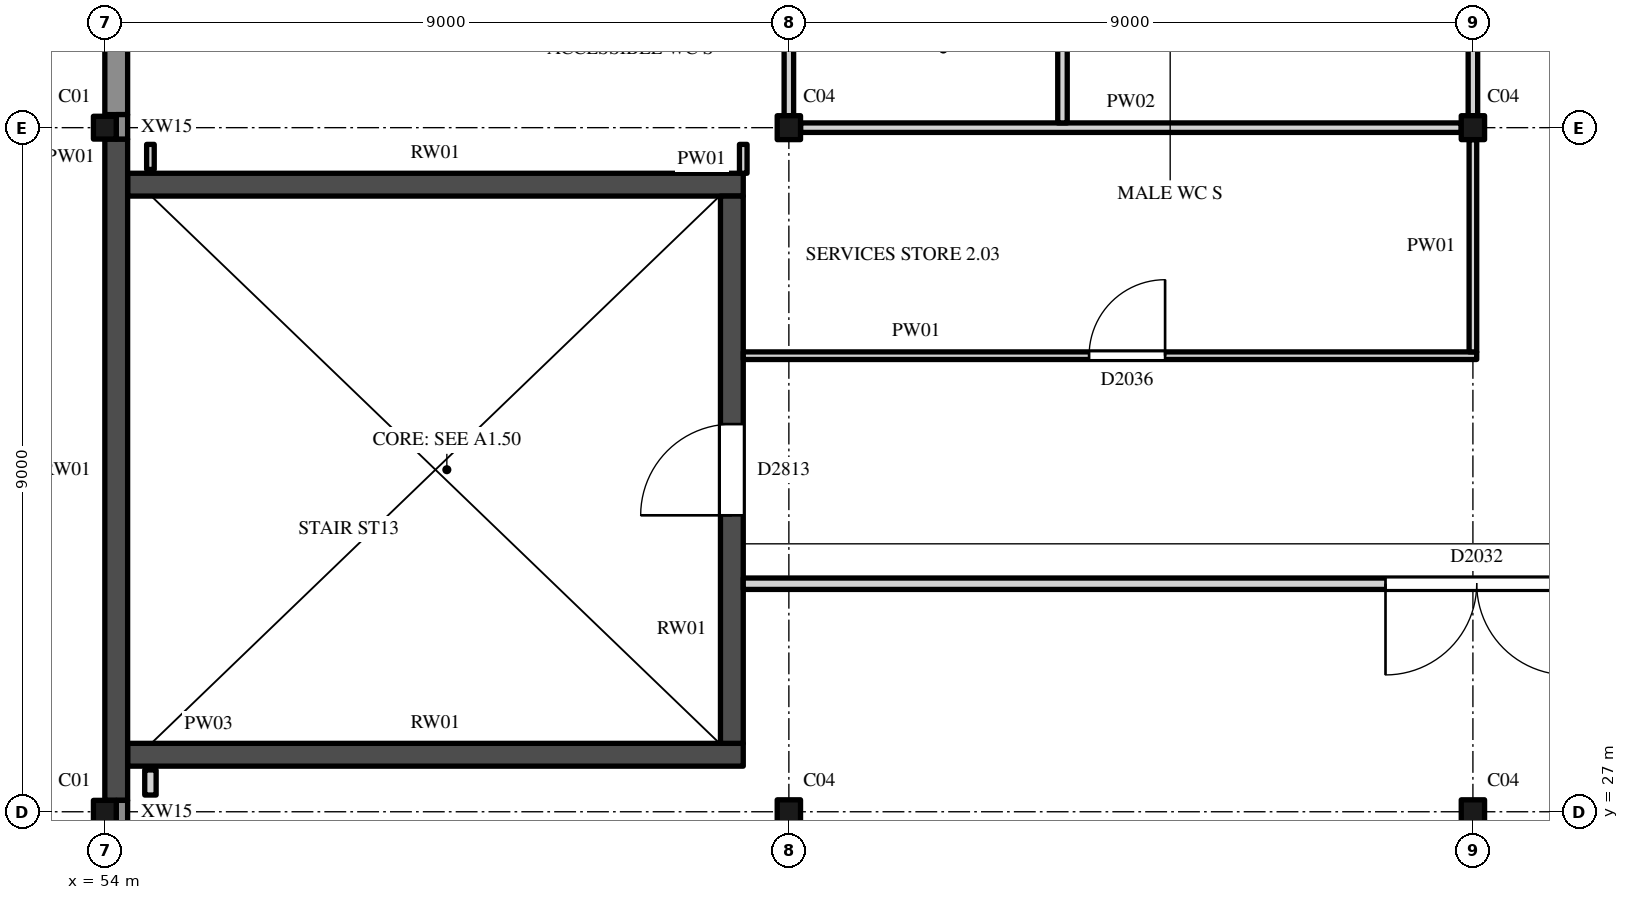
"""IFC4 building model, lengths in metres.
Left out: names, types, materials, properties, quantities, classifications, styles, units other than length and angle.
Written with IfcOpenShell. Run it as: python <this file> out.ifc"""

import sys

from ifc_helpers import new_model, si_unit, direction, frame, frame_2d, origin, origin_2d, place, context, subcontext, project, spatial, rectangle, hollow_rectangle, i_section, extrude, element, fill, save


model = new_model("IFC4")
c1 = context("Model", 3, precision=1e-05, world=origin(), true_north=direction((0.0, 1.0)))
c2 = subcontext(c1, "Body", "Model", "MODEL_VIEW")
j1 = project(units=[si_unit("LENGTHUNIT", "METRE"), si_unit("PLANEANGLEUNIT", "RADIAN")], contexts=[c1])
p1 = place(None, origin())
s1 = spatial("IfcSite", under=j1, at=p1, CompositionType="ELEMENT")
p2 = place(p1, origin())
s2 = spatial("IfcBuilding", under=s1, at=p2, CompositionType="ELEMENT")
p3 = place(p2, frame((0.0, 0.0, 11.0)))
s3 = spatial("IfcBuildingStorey", under=s2, at=p3, CompositionType="ELEMENT", Elevation=11.0)
p4 = place(p3, frame((54.0, 27.0, 0.0), z_axis=(0.0, 0.0, 1.0), x_axis=(1.0, 0.0, 0.0)))
e1 = element("IfcColumn", 1, at=p4, inside=s3, PredefinedType="COLUMN", context=c2, shape_type="SweptSolid", body=[
    extrude(hollow_rectangle(XDim=0.3, YDim=0.3, WallThickness=0.012, InnerFilletRadius=0.019, OuterFilletRadius=0.031, at=origin_2d()), origin(), (0.0, 0.0, 1.0), 5.0),
])
for number, where, z_axis, x_axis in (
    (2, (63.0, 27.0, 0.0), (0.0, 0.0, 1.0), (1.0, 0.0, 0.0)),
    (3, (72.0, 27.0, 0.0), (0.0, 0.0, 1.0), (1.0, 0.0, 0.0)),
):
    element("IfcColumn", number, at=place(p3, frame(where, z_axis=z_axis, x_axis=x_axis)), inside=s3, PredefinedType="COLUMN", context=c2, shape_type="SweptSolid", body=[
        extrude(i_section(OverallWidth=0.307, OverallDepth=0.315, WebThickness=0.012, FlangeThickness=0.019, FilletRadius=0.017, at=origin_2d()), origin(), (0.0, 0.0, 1.0), 5.0),
    ])
p5 = place(p3, frame((54.0, 36.0, 0.0), z_axis=(0.0, 0.0, 1.0), x_axis=(1.0, 0.0, 0.0)))
e4 = element("IfcColumn", 4, at=p5, inside=s3, PredefinedType="COLUMN", context=c2, shape_type="SweptSolid", body=[
    extrude(hollow_rectangle(XDim=0.3, YDim=0.3, WallThickness=0.012, InnerFilletRadius=0.019, OuterFilletRadius=0.031, at=origin_2d()), origin(), (0.0, 0.0, 1.0), 5.0),
])
for number, where, z_axis, x_axis in (
    (5, (63.0, 36.0, 0.0), (0.0, 0.0, 1.0), (1.0, 0.0, 0.0)),
    (6, (72.0, 36.0, 0.0), (0.0, 0.0, 1.0), (1.0, 0.0, 0.0)),
):
    element("IfcColumn", number, at=place(p3, frame(where, z_axis=z_axis, x_axis=x_axis)), inside=s3, PredefinedType="COLUMN", context=c2, shape_type="SweptSolid", body=[
        extrude(i_section(OverallWidth=0.307, OverallDepth=0.315, WebThickness=0.012, FlangeThickness=0.019, FilletRadius=0.017, at=origin_2d()), origin(), (0.0, 0.0, 1.0), 5.0),
    ])
for number, where, z_axis, x_axis in (
    (7, (54.3, 27.75, 0.0), (0.0, 0.0, 1.0), (1.0, 0.0, 0.0)),
    (8, (54.3, 35.25, 0.0), (0.0, 0.0, 1.0), (1.0, 0.0, 0.0)),
):
    element("IfcWall", number, at=place(p3, frame(where, z_axis=z_axis, x_axis=x_axis)), inside=s3, PredefinedType="SHEAR", context=c2, shape_type="SweptSolid", body=[
        extrude(rectangle(XDim=8.1, YDim=0.3, at=frame_2d((4.05, 0.0))), origin(), (0.0, 0.0, 1.0), 4.825),
    ])
p6 = place(p3, frame((54.15, 27.15, 0.0), z_axis=(0.0, 0.0, 1.0), x_axis=(0.0, 1.0, 0.0)))
e9 = element("IfcWall", 9, at=p6, inside=s3, PredefinedType="SHEAR", context=c2, shape_type="SweptSolid", body=[
    extrude(rectangle(XDim=8.7, YDim=0.3, at=frame_2d((4.35, 0.0))), origin(), (0.0, 0.0, 1.0), 4.825),
])
p7 = place(p3, frame((62.25, 27.9, 0.0), z_axis=(0.0, 0.0, 1.0), x_axis=(0.0, 1.0, 0.0)))
e10 = element("IfcWall", 10, at=p7, inside=s3, PredefinedType="SHEAR", context=c2, shape_type="SweptSolid", body=[
    extrude(rectangle(XDim=7.2, YDim=0.3, at=frame_2d((3.6, 0.0))), origin(), (0.0, 0.0, 1.0), 4.825),
])
p8 = place(p7, frame((3.0, 0.0, 0.0)))
e11 = element("IfcOpeningElement", 11, at=p8, cuts=e10, PredefinedType="OPENING", context=c2, shape_type="SweptSolid", body=[
    extrude(rectangle(XDim=1.2, YDim=2.1, at=frame_2d((0.6, 1.05))), frame((0.0, 0.16, 0.0), z_axis=(0.0, -1.0, 0.0), x_axis=(1.0, 0.0, 0.0)), (0.0, 0.0, 1.0), 0.32),
])
p9 = place(p3, frame((54.15, 36.172, 0.0), z_axis=(0.0, 0.0, 1.0), x_axis=(0.0, 1.0, 0.0)))
e12 = element("IfcWall", 12, at=p9, inside=s3, PredefinedType="SOLIDWALL", context=c2, shape_type="SweptSolid", body=[
    extrude(rectangle(XDim=8.667, YDim=0.3, at=frame_2d((4.333, 0.0))), origin(), (0.0, 0.0, 1.0), 4.825),
])
p10 = place(p9, frame((1.478, 0.0, 1.2)))
e13 = element("IfcOpeningElement", 13, at=p10, cuts=e12, PredefinedType="OPENING", context=c2, shape_type="SweptSolid", body=[
    extrude(rectangle(XDim=1.2, YDim=1.5, at=frame_2d((0.6, 0.75))), frame((0.0, 0.16, 0.0), z_axis=(0.0, -1.0, 0.0), x_axis=(1.0, 0.0, 0.0)), (0.0, 0.0, 1.0), 0.32),
])
p11 = place(p9, frame((5.978, 0.0, 1.2)))
e14 = element("IfcOpeningElement", 14, at=p11, cuts=e12, PredefinedType="OPENING", context=c2, shape_type="SweptSolid", body=[
    extrude(rectangle(XDim=1.2, YDim=1.5, at=frame_2d((0.6, 0.75))), frame((0.0, 0.16, 0.0), z_axis=(0.0, -1.0, 0.0), x_axis=(1.0, 0.0, 0.0)), (0.0, 0.0, 1.0), 0.32),
])
for number, where, z_axis, x_axis in (
    (15, (54.225, 26.828, 0.0), (0.0, 0.0, 1.0), (0.0, 1.0, 0.0)),
    (16, (54.225, 35.85, 0.0), (0.0, 0.0, 1.0), (0.0, 1.0, 0.0)),
):
    element("IfcWall", number, at=place(p3, frame(where, z_axis=z_axis, x_axis=x_axis)), inside=s3, PredefinedType="SOLIDWALL", context=c2, shape_type="SweptSolid", body=[
        extrude(rectangle(XDim=0.322, YDim=0.15, at=frame_2d((0.161, 0.0))), origin(), (0.0, 0.0, 1.0), 4.825),
    ])
for number, where, z_axis, x_axis in (
    (17, (55.5, 29.325, 5.0), (0.0, 0.0, 1.0), (1.0, 0.0, 0.0)),
    (18, (55.5, 33.675, 5.0), (0.0, 0.0, 1.0), (1.0, 0.0, 0.0)),
):
    element("IfcWall", number, at=place(p3, frame(where, z_axis=z_axis, x_axis=x_axis)), inside=s3, PredefinedType="PARAPET", context=c2, shape_type="SweptSolid", body=[
        extrude(rectangle(XDim=6.0, YDim=0.15, at=frame_2d((3.0, 0.0))), origin(), (0.0, 0.0, 1.0), 0.5),
    ])
for number, where, z_axis, x_axis in (
    (19, (55.575, 29.4, 5.0), (0.0, 0.0, 1.0), (0.0, 1.0, 0.0)),
    (20, (61.425, 29.4, 5.0), (0.0, 0.0, 1.0), (0.0, 1.0, 0.0)),
):
    element("IfcWall", number, at=place(p3, frame(where, z_axis=z_axis, x_axis=x_axis)), inside=s3, PredefinedType="PARAPET", context=c2, shape_type="SweptSolid", body=[
        extrude(rectangle(XDim=4.2, YDim=0.15, at=frame_2d((2.1, 0.0))), origin(), (0.0, 0.0, 1.0), 0.5),
    ])
for number, where, z_axis, x_axis in (
    (21, (64.5, 29.325, 5.0), (0.0, 0.0, 1.0), (1.0, 0.0, 0.0)),
    (22, (64.5, 33.675, 5.0), (0.0, 0.0, 1.0), (1.0, 0.0, 0.0)),
):
    element("IfcWall", number, at=place(p3, frame(where, z_axis=z_axis, x_axis=x_axis)), inside=s3, PredefinedType="PARAPET", context=c2, shape_type="SweptSolid", body=[
        extrude(rectangle(XDim=6.0, YDim=0.15, at=frame_2d((3.0, 0.0))), origin(), (0.0, 0.0, 1.0), 0.5),
    ])
for number, where, z_axis, x_axis in (
    (23, (64.575, 29.4, 5.0), (0.0, 0.0, 1.0), (0.0, 1.0, 0.0)),
    (24, (70.425, 29.4, 5.0), (0.0, 0.0, 1.0), (0.0, 1.0, 0.0)),
):
    element("IfcWall", number, at=place(p3, frame(where, z_axis=z_axis, x_axis=x_axis)), inside=s3, PredefinedType="PARAPET", context=c2, shape_type="SweptSolid", body=[
        extrude(rectangle(XDim=4.2, YDim=0.15, at=frame_2d((2.1, 0.0))), origin(), (0.0, 0.0, 1.0), 0.5),
    ])
p12 = place(p3, frame((62.4, 30.0, 0.0), z_axis=(0.0, 0.0, 1.0), x_axis=(1.0, 0.0, 0.0)))
e25 = element("IfcWall", 25, at=p12, inside=s3, PredefinedType="PARTITIONING", context=c2, shape_type="SweptSolid", body=[
    extrude(rectangle(XDim=36.675, YDim=0.15, at=frame_2d((18.337, 0.0))), origin(), (0.0, 0.0, 1.0), 4.422),
])
p13 = place(p12, frame((8.45, 0.0, 0.0)))
e26 = element("IfcOpeningElement", 26, at=p13, cuts=e25, PredefinedType="OPENING", context=c2, shape_type="SweptSolid", body=[
    extrude(rectangle(XDim=2.4, YDim=3.0, at=frame_2d((1.2, 1.5))), frame((0.0, 0.085, 0.0), z_axis=(0.0, -1.0, 0.0), x_axis=(1.0, 0.0, 0.0)), (0.0, 0.0, 1.0), 0.17),
])
p14 = place(p12, frame((26.35, 0.0, 0.0)))
e27 = element("IfcOpeningElement", 27, at=p14, cuts=e25, PredefinedType="OPENING", context=c2, shape_type="SweptSolid", body=[
    extrude(rectangle(XDim=2.4, YDim=3.0, at=frame_2d((1.2, 1.5))), frame((0.0, 0.085, 0.0), z_axis=(0.0, -1.0, 0.0), x_axis=(1.0, 0.0, 0.0)), (0.0, 0.0, 1.0), 0.17),
])
p15 = place(p3, frame((62.4, 33.0, 0.0), z_axis=(0.0, 0.0, 1.0), x_axis=(1.0, 0.0, 0.0)))
e28 = element("IfcWall", 28, at=p15, inside=s3, PredefinedType="PARTITIONING", context=c2, shape_type="SweptSolid", body=[
    extrude(rectangle(XDim=9.65, YDim=0.1, at=frame_2d((4.825, 0.0))), origin(), (0.0, 0.0, 1.0), 4.422),
])
p16 = place(p15, frame((4.55, 0.0, 0.0)))
e29 = element("IfcOpeningElement", 29, at=p16, cuts=e28, PredefinedType="OPENING", context=c2, shape_type="SweptSolid", body=[
    extrude(rectangle(XDim=1.0, YDim=2.1, at=frame_2d((0.5, 1.05))), frame((0.0, 0.06, 0.0), z_axis=(0.0, -1.0, 0.0), x_axis=(1.0, 0.0, 0.0)), (0.0, 0.0, 1.0), 0.12),
])
p17 = place(p3, frame((63.154, 36.0, 0.0), z_axis=(0.0, 0.0, 1.0), x_axis=(1.0, 0.0, 0.0)))
e30 = element("IfcWall", 30, at=p17, inside=s3, PredefinedType="PARTITIONING", context=c2, shape_type="SweptSolid", body=[
    extrude(rectangle(XDim=8.693, YDim=0.125, at=frame_2d((4.346, 0.0))), origin(), (0.0, 0.0, 1.0), 4.419),
])
p18 = place(p3, frame((54.6, 27.22, 0.0), z_axis=(0.0, 0.0, 1.0), x_axis=(0.0, 1.0, 0.0)))
e31 = element("IfcWall", 31, at=p18, inside=s3, PredefinedType="PARTITIONING", context=c2, shape_type="SweptSolid", body=[
    extrude(rectangle(XDim=0.33, YDim=0.15, at=frame_2d((0.165, 0.0))), origin(), (0.0, 0.0, 1.0), 4.825),
])
p19 = place(p3, frame((54.6, 35.45, 0.0), z_axis=(0.0, 0.0, 1.0), x_axis=(0.0, 1.0, 0.0)))
e32 = element("IfcWall", 32, at=p19, inside=s3, PredefinedType="PARTITIONING", context=c2, shape_type="SweptSolid", body=[
    extrude(rectangle(XDim=0.33, YDim=0.1, at=frame_2d((0.165, 0.0))), origin(), (0.0, 0.0, 1.0), 4.825),
])
p20 = place(p3, frame((62.4, 35.4, 0.0), z_axis=(0.0, 0.0, 1.0), x_axis=(0.0, 1.0, 0.0)))
e33 = element("IfcWall", 33, at=p20, inside=s3, PredefinedType="PARTITIONING", context=c2, shape_type="SweptSolid", body=[
    extrude(rectangle(XDim=0.38, YDim=0.1, at=frame_2d((0.19, 0.0))), origin(), (0.0, 0.0, 1.0), 4.825),
])
p21 = place(p3, frame((63.0, 36.157, 0.0), z_axis=(0.0, 0.0, 1.0), x_axis=(0.0, 1.0, 0.0)))
e34 = element("IfcWall", 34, at=p21, inside=s3, PredefinedType="PARTITIONING", context=c2, shape_type="SweptSolid", body=[
    extrude(rectangle(XDim=8.686, YDim=0.125, at=frame_2d((4.343, 0.0))), origin(), (0.0, 0.0, 1.0), 4.297),
])
p22 = place(p21, frame((3.593, 0.0, 0.0)))
e35 = element("IfcOpeningElement", 35, at=p22, cuts=e34, PredefinedType="OPENING", context=c2, shape_type="SweptSolid", body=[
    extrude(rectangle(XDim=0.95, YDim=2.1, at=frame_2d((0.475, 1.05))), frame((0.0, 0.073, 0.0), z_axis=(0.0, -1.0, 0.0), x_axis=(1.0, 0.0, 0.0)), (0.0, 0.0, 1.0), 0.145),
])
p23 = place(p3, frame((66.6, 36.062, 0.0), z_axis=(0.0, 0.0, 1.0), x_axis=(0.0, 1.0, 0.0)))
e36 = element("IfcWall", 36, at=p23, inside=s3, PredefinedType="PARTITIONING", context=c2, shape_type="SweptSolid", body=[
    extrude(rectangle(XDim=2.875, YDim=0.125, at=frame_2d((1.438, 0.0))), origin(), (0.0, 0.0, 1.0), 4.825),
])
p24 = place(p3, frame((72.0, 33.05, 0.0), z_axis=(0.0, 0.0, 1.0), x_axis=(0.0, 1.0, 0.0)))
e37 = element("IfcWall", 37, at=p24, inside=s3, PredefinedType="PARTITIONING", context=c2, shape_type="SweptSolid", body=[
    extrude(rectangle(XDim=2.793, YDim=0.1, at=frame_2d((1.396, 0.0))), origin(), (0.0, 0.0, 1.0), 4.297),
])
p25 = place(p3, frame((72.0, 36.157, 0.0), z_axis=(0.0, 0.0, 1.0), x_axis=(0.0, 1.0, 0.0)))
e38 = element("IfcWall", 38, at=p25, inside=s3, PredefinedType="PARTITIONING", context=c2, shape_type="SweptSolid", body=[
    extrude(rectangle(XDim=2.78, YDim=0.125, at=frame_2d((1.39, 0.0))), origin(), (0.0, 0.0, 1.0), 4.297),
])
p26 = place(p8, origin())
e39 = element("IfcDoor", 39, at=p26, inside=s3, OperationType="SINGLE_SWING_RIGHT", PredefinedType="DOOR", context=c2, shape_type="SweptSolid", body=[
    extrude(rectangle(XDim=1.2, YDim=2.1, at=frame_2d((0.6, 1.05))), frame((0.0, 0.025, 0.0), z_axis=(0.0, -1.0, 0.0), x_axis=(1.0, 0.0, 0.0)), (0.0, 0.0, 1.0), 0.05),
])
fill(e11, e39)
p27 = place(p13, origin())
e40 = element("IfcDoor", 40, at=p27, inside=s3, OperationType="DOUBLE_DOOR_SINGLE_SWING", PredefinedType="DOOR", context=c2, shape_type="SweptSolid", body=[
    extrude(rectangle(XDim=2.4, YDim=3.0, at=frame_2d((1.2, 1.5))), frame((0.0, 0.025, 0.0), z_axis=(0.0, -1.0, 0.0), x_axis=(1.0, 0.0, 0.0)), (0.0, 0.0, 1.0), 0.05),
])
fill(e26, e40)
p28 = place(p16, origin())
e41 = element("IfcDoor", 41, at=p28, inside=s3, OperationType="SINGLE_SWING_LEFT", PredefinedType="DOOR", context=c2, shape_type="SweptSolid", body=[
    extrude(rectangle(XDim=1.0, YDim=2.1, at=frame_2d((0.5, 1.05))), frame((0.0, 0.025, 0.0), z_axis=(0.0, -1.0, 0.0), x_axis=(1.0, 0.0, 0.0)), (0.0, 0.0, 1.0), 0.05),
])
fill(e29, e41)
save(model, sys.argv[1])
